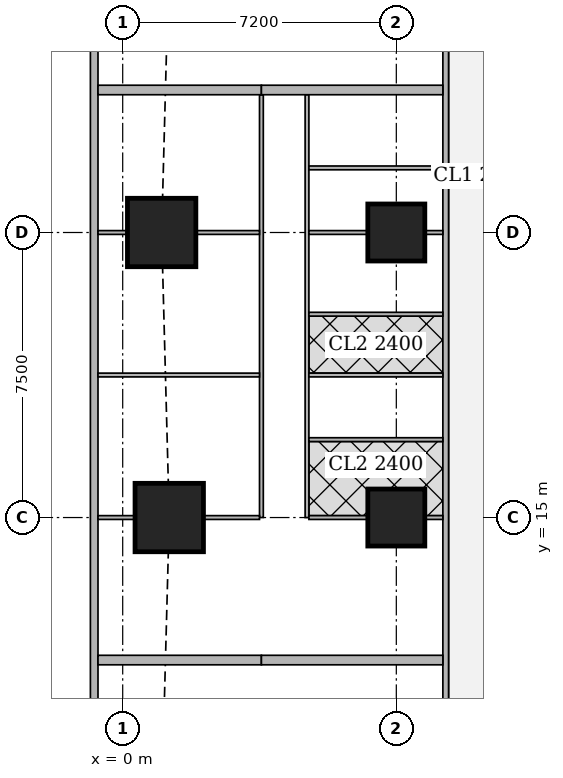
"""IFC4 building model, lengths in metres.
Left out: names, types, materials, properties, quantities, classifications, styles, units other than length and angle.
Written with IfcOpenShell. Run it as: python <this file> out.ifc"""

import sys

from ifc_helpers import new_model, si_unit, direction, frame, frame_2d, origin, origin_2d, place, context, subcontext, project, spatial, rectangle, extrude, element, fill, save


model = new_model("IFC4")
c1 = context("Model", 3, precision=1e-05, world=origin(), true_north=direction((0.0, 1.0)))
c2 = subcontext(c1, "Body", "Model", "MODEL_VIEW")
j1 = project(units=[si_unit("LENGTHUNIT", "METRE"), si_unit("PLANEANGLEUNIT", "RADIAN")], contexts=[c1])
p1 = place(None, origin())
s1 = spatial("IfcSite", under=j1, at=p1, CompositionType="ELEMENT")
p2 = place(p1, origin())
s2 = spatial("IfcBuilding", under=s1, at=p2, CompositionType="ELEMENT")
p3 = place(p2, frame((0.0, 0.0, 139.55)))
s3 = spatial("IfcBuildingStorey", under=s2, at=p3, CompositionType="ELEMENT", Elevation=139.55)
p4 = place(p3, frame((1.225, 15.0, 0.0), z_axis=(0.0, 0.0, 1.0), x_axis=(1.0, 0.0, 0.0)))
e1 = element("IfcColumn", 1, at=p4, inside=s3, PredefinedType="COLUMN", context=c2, shape_type="SweptSolid", body=[
    extrude(rectangle(XDim=1.8, YDim=1.8, at=origin_2d()), origin(), (0.0, 0.0, 1.0), 3.75),
])
p5 = place(p3, frame((7.2, 15.0, 0.0), z_axis=(0.0, 0.0, 1.0), x_axis=(1.0, 0.0, 0.0)))
e2 = element("IfcColumn", 2, at=p5, inside=s3, PredefinedType="COLUMN", context=c2, shape_type="SweptSolid", body=[
    extrude(rectangle(XDim=1.5, YDim=1.5, at=origin_2d()), origin(), (0.0, 0.0, 1.0), 3.75),
])
p6 = place(p3, frame((1.025, 22.5, 0.0), z_axis=(0.0, 0.0, 1.0), x_axis=(1.0, 0.0, 0.0)))
e3 = element("IfcColumn", 3, at=p6, inside=s3, PredefinedType="COLUMN", context=c2, shape_type="SweptSolid", body=[
    extrude(rectangle(XDim=1.8, YDim=1.8, at=origin_2d()), origin(), (0.0, 0.0, 1.0), 3.75),
])
p7 = place(p3, frame((7.2, 22.5, 0.0), z_axis=(0.0, 0.0, 1.0), x_axis=(1.0, 0.0, 0.0)))
e4 = element("IfcColumn", 4, at=p7, inside=s3, PredefinedType="COLUMN", context=c2, shape_type="SweptSolid", body=[
    extrude(rectangle(XDim=1.5, YDim=1.5, at=origin_2d()), origin(), (0.0, 0.0, 1.0), 3.75),
])
p8 = place(p3, frame((-0.75, 42.837, 0.0), z_axis=(0.0, 0.0, 1.0), x_axis=(0.0, -1.0, 0.0)))
e5 = element("IfcWall", 5, at=p8, inside=s3, PredefinedType="SOLIDWALL", context=c2, shape_type="SweptSolid", body=[
    extrude(rectangle(XDim=40.674, YDim=0.2, at=frame_2d((20.337, 0.0))), origin(), (0.0, 0.0, 1.0), 3.5),
])
p9 = place(p8, frame((1.78, 0.0, 0.9)))
e6 = element("IfcOpeningElement", 6, at=p9, cuts=e5, PredefinedType="OPENING", context=c2, shape_type="SweptSolid", body=[
    extrude(rectangle(XDim=1.8, YDim=1.5, at=frame_2d((0.9, 0.75))), frame((0.0, 0.11, 0.0), z_axis=(0.0, -1.0, 0.0), x_axis=(1.0, 0.0, 0.0)), (0.0, 0.0, 1.0), 0.22),
])
p10 = place(p8, frame((6.312, 0.0, 0.9)))
e7 = element("IfcOpeningElement", 7, at=p10, cuts=e5, PredefinedType="OPENING", context=c2, shape_type="SweptSolid", body=[
    extrude(rectangle(XDim=1.8, YDim=1.5, at=frame_2d((0.9, 0.75))), frame((0.0, 0.11, 0.0), z_axis=(0.0, -1.0, 0.0), x_axis=(1.0, 0.0, 0.0)), (0.0, 0.0, 1.0), 0.22),
])
p11 = place(p8, frame((10.062, 0.0, 0.9)))
e8 = element("IfcOpeningElement", 8, at=p11, cuts=e5, PredefinedType="OPENING", context=c2, shape_type="SweptSolid", body=[
    extrude(rectangle(XDim=1.8, YDim=1.5, at=frame_2d((0.9, 0.75))), frame((0.0, 0.11, 0.0), z_axis=(0.0, -1.0, 0.0), x_axis=(1.0, 0.0, 0.0)), (0.0, 0.0, 1.0), 0.22),
])
p12 = place(p8, frame((13.812, 0.0, 0.9)))
e9 = element("IfcOpeningElement", 9, at=p12, cuts=e5, PredefinedType="OPENING", context=c2, shape_type="SweptSolid", body=[
    extrude(rectangle(XDim=1.8, YDim=1.5, at=frame_2d((0.9, 0.75))), frame((0.0, 0.11, 0.0), z_axis=(0.0, -1.0, 0.0), x_axis=(1.0, 0.0, 0.0)), (0.0, 0.0, 1.0), 0.22),
])
p13 = place(p8, frame((17.562, 0.0, 0.9)))
e10 = element("IfcOpeningElement", 10, at=p13, cuts=e5, PredefinedType="OPENING", context=c2, shape_type="SweptSolid", body=[
    extrude(rectangle(XDim=1.8, YDim=1.5, at=frame_2d((0.9, 0.75))), frame((0.0, 0.11, 0.0), z_axis=(0.0, -1.0, 0.0), x_axis=(1.0, 0.0, 0.0)), (0.0, 0.0, 1.0), 0.22),
])
p14 = place(p8, frame((21.312, 0.0, 0.9)))
e11 = element("IfcOpeningElement", 11, at=p14, cuts=e5, PredefinedType="OPENING", context=c2, shape_type="SweptSolid", body=[
    extrude(rectangle(XDim=1.8, YDim=1.5, at=frame_2d((0.9, 0.75))), frame((0.0, 0.11, 0.0), z_axis=(0.0, -1.0, 0.0), x_axis=(1.0, 0.0, 0.0)), (0.0, 0.0, 1.0), 0.22),
])
p15 = place(p8, frame((25.062, 0.0, 0.9)))
e12 = element("IfcOpeningElement", 12, at=p15, cuts=e5, PredefinedType="OPENING", context=c2, shape_type="SweptSolid", body=[
    extrude(rectangle(XDim=1.8, YDim=1.5, at=frame_2d((0.9, 0.75))), frame((0.0, 0.11, 0.0), z_axis=(0.0, -1.0, 0.0), x_axis=(1.0, 0.0, 0.0)), (0.0, 0.0, 1.0), 0.22),
])
p16 = place(p8, frame((28.812, 0.0, 0.9)))
e13 = element("IfcOpeningElement", 13, at=p16, cuts=e5, PredefinedType="OPENING", context=c2, shape_type="SweptSolid", body=[
    extrude(rectangle(XDim=1.8, YDim=1.5, at=frame_2d((0.9, 0.75))), frame((0.0, 0.11, 0.0), z_axis=(0.0, -1.0, 0.0), x_axis=(1.0, 0.0, 0.0)), (0.0, 0.0, 1.0), 0.22),
])
p17 = place(p8, frame((32.562, 0.0, 0.9)))
e14 = element("IfcOpeningElement", 14, at=p17, cuts=e5, PredefinedType="OPENING", context=c2, shape_type="SweptSolid", body=[
    extrude(rectangle(XDim=1.8, YDim=1.5, at=frame_2d((0.9, 0.75))), frame((0.0, 0.11, 0.0), z_axis=(0.0, -1.0, 0.0), x_axis=(1.0, 0.0, 0.0)), (0.0, 0.0, 1.0), 0.22),
])
p18 = place(p8, frame((37.094, 0.0, 0.9)))
e15 = element("IfcOpeningElement", 15, at=p18, cuts=e5, PredefinedType="OPENING", context=c2, shape_type="SweptSolid", body=[
    extrude(rectangle(XDim=1.8, YDim=1.5, at=frame_2d((0.9, 0.75))), frame((0.0, 0.11, 0.0), z_axis=(0.0, -1.0, 0.0), x_axis=(1.0, 0.0, 0.0)), (0.0, 0.0, 1.0), 0.22),
])
p19 = place(p3, frame((8.5, 1.964, 0.0), z_axis=(0.0, 0.0, 1.0), x_axis=(0.0, 1.0, 0.0)))
e16 = element("IfcWall", 16, at=p19, inside=s3, PredefinedType="SOLIDWALL", context=c2, shape_type="SweptSolid", body=[
    extrude(rectangle(XDim=41.097, YDim=0.15, at=frame_2d((20.548, 0.0))), origin(), (0.0, 0.0, 1.0), 3.5),
])
p20 = place(p19, frame((6.911, 0.0, 0.0)))
e17 = element("IfcOpeningElement", 17, at=p20, cuts=e16, PredefinedType="OPENING", context=c2, shape_type="SweptSolid", body=[
    extrude(rectangle(XDim=1.0, YDim=2.1, at=frame_2d((0.5, 1.05))), frame((0.0, 0.085, 0.0), z_axis=(0.0, -1.0, 0.0), x_axis=(1.0, 0.0, 0.0)), (0.0, 0.0, 1.0), 0.17),
])
p21 = place(p19, frame((10.661, 0.0, 0.0)))
e18 = element("IfcOpeningElement", 18, at=p21, cuts=e16, PredefinedType="OPENING", context=c2, shape_type="SweptSolid", body=[
    extrude(rectangle(XDim=1.0, YDim=2.1, at=frame_2d((0.5, 1.05))), frame((0.0, 0.085, 0.0), z_axis=(0.0, -1.0, 0.0), x_axis=(1.0, 0.0, 0.0)), (0.0, 0.0, 1.0), 0.17),
])
p22 = place(p19, frame((25.661, 0.0, 0.0)))
e19 = element("IfcOpeningElement", 19, at=p22, cuts=e16, PredefinedType="OPENING", context=c2, shape_type="SweptSolid", body=[
    extrude(rectangle(XDim=1.0, YDim=2.1, at=frame_2d((0.5, 1.05))), frame((0.0, 0.085, 0.0), z_axis=(0.0, -1.0, 0.0), x_axis=(1.0, 0.0, 0.0)), (0.0, 0.0, 1.0), 0.17),
])
p23 = place(p19, frame((33.161, 0.0, 0.0)))
e20 = element("IfcOpeningElement", 20, at=p23, cuts=e16, PredefinedType="OPENING", context=c2, shape_type="SweptSolid", body=[
    extrude(rectangle(XDim=1.0, YDim=2.1, at=frame_2d((0.5, 1.05))), frame((0.0, 0.085, 0.0), z_axis=(0.0, -1.0, 0.0), x_axis=(1.0, 0.0, 0.0)), (0.0, 0.0, 1.0), 0.17),
])
p24 = place(p3, frame((3.65, 15.0, 0.0), z_axis=(0.0, 0.0, 1.0), x_axis=(0.0, 1.0, 0.0)))
e21 = element("IfcWall", 21, at=p24, inside=s3, PredefinedType="PARTITIONING", context=c2, shape_type="SweptSolid", body=[
    extrude(rectangle(XDim=11.125, YDim=0.1, at=frame_2d((5.562, 0.0))), origin(), (0.0, 0.0, 1.0), 3.5),
])
p25 = place(p24, frame((0.2, 0.0, 0.0)))
e22 = element("IfcOpeningElement", 22, at=p25, cuts=e21, PredefinedType="OPENING", context=c2, shape_type="SweptSolid", body=[
    extrude(rectangle(XDim=0.9, YDim=2.1, at=frame_2d((0.45, 1.05))), frame((0.0, 0.06, 0.0), z_axis=(0.0, -1.0, 0.0), x_axis=(1.0, 0.0, 0.0)), (0.0, 0.0, 1.0), 0.12),
])
p26 = place(p24, frame((3.95, 0.0, 0.0)))
e23 = element("IfcOpeningElement", 23, at=p26, cuts=e21, PredefinedType="OPENING", context=c2, shape_type="SweptSolid", body=[
    extrude(rectangle(XDim=0.9, YDim=2.1, at=frame_2d((0.45, 1.05))), frame((0.0, 0.06, 0.0), z_axis=(0.0, -1.0, 0.0), x_axis=(1.0, 0.0, 0.0)), (0.0, 0.0, 1.0), 0.12),
])
p27 = place(p24, frame((7.7, 0.0, 0.0)))
e24 = element("IfcOpeningElement", 24, at=p27, cuts=e21, PredefinedType="OPENING", context=c2, shape_type="SweptSolid", body=[
    extrude(rectangle(XDim=0.9, YDim=2.1, at=frame_2d((0.45, 1.05))), frame((0.0, 0.06, 0.0), z_axis=(0.0, -1.0, 0.0), x_axis=(1.0, 0.0, 0.0)), (0.0, 0.0, 1.0), 0.12),
])
p28 = place(p3, frame((4.85, 15.0, 0.0), z_axis=(0.0, 0.0, 1.0), x_axis=(0.0, 1.0, 0.0)))
e25 = element("IfcWall", 25, at=p28, inside=s3, PredefinedType="PARTITIONING", context=c2, shape_type="SweptSolid", body=[
    extrude(rectangle(XDim=11.125, YDim=0.1, at=frame_2d((5.562, 0.0))), origin(), (0.0, 0.0, 1.0), 3.5),
])
p29 = place(p28, frame((0.575, 0.0, 0.0)))
e26 = element("IfcOpeningElement", 26, at=p29, cuts=e25, PredefinedType="OPENING", context=c2, shape_type="SweptSolid", body=[
    extrude(rectangle(XDim=0.9, YDim=2.1, at=frame_2d((0.45, 1.05))), frame((0.0, 0.06, 0.0), z_axis=(0.0, -1.0, 0.0), x_axis=(1.0, 0.0, 0.0)), (0.0, 0.0, 1.0), 0.12),
])
p30 = place(p28, frame((4.1, 0.0, 0.0)))
e27 = element("IfcOpeningElement", 27, at=p30, cuts=e25, PredefinedType="OPENING", context=c2, shape_type="SweptSolid", body=[
    extrude(rectangle(XDim=0.9, YDim=2.1, at=frame_2d((0.45, 1.05))), frame((0.0, 0.06, 0.0), z_axis=(0.0, -1.0, 0.0), x_axis=(1.0, 0.0, 0.0)), (0.0, 0.0, 1.0), 0.12),
])
p31 = place(p28, frame((7.9, 0.0, 0.0)))
e28 = element("IfcOpeningElement", 28, at=p31, cuts=e25, PredefinedType="OPENING", context=c2, shape_type="SweptSolid", body=[
    extrude(rectangle(XDim=0.9, YDim=2.1, at=frame_2d((0.45, 1.05))), frame((0.0, 0.06, 0.0), z_axis=(0.0, -1.0, 0.0), x_axis=(1.0, 0.0, 0.0)), (0.0, 0.0, 1.0), 0.12),
])
p32 = place(p28, frame((2.45, 0.0, 0.0)))
e29 = element("IfcOpeningElement", 29, at=p32, cuts=e25, PredefinedType="OPENING", context=c2, shape_type="SweptSolid", body=[
    extrude(rectangle(XDim=0.9, YDim=2.1, at=frame_2d((0.45, 1.05))), frame((0.0, 0.06, 0.0), z_axis=(0.0, -1.0, 0.0), x_axis=(1.0, 0.0, 0.0)), (0.0, 0.0, 1.0), 0.12),
])
p33 = place(p28, frame((5.975, 0.0, 0.0)))
e30 = element("IfcOpeningElement", 30, at=p33, cuts=e25, PredefinedType="OPENING", context=c2, shape_type="SweptSolid", body=[
    extrude(rectangle(XDim=0.9, YDim=2.1, at=frame_2d((0.45, 1.05))), frame((0.0, 0.06, 0.0), z_axis=(0.0, -1.0, 0.0), x_axis=(1.0, 0.0, 0.0)), (0.0, 0.0, 1.0), 0.12),
])
p34 = place(p28, frame((9.775, 0.0, 0.0)))
e31 = element("IfcOpeningElement", 31, at=p34, cuts=e25, PredefinedType="OPENING", context=c2, shape_type="SweptSolid", body=[
    extrude(rectangle(XDim=0.9, YDim=2.1, at=frame_2d((0.45, 1.05))), frame((0.0, 0.06, 0.0), z_axis=(0.0, -1.0, 0.0), x_axis=(1.0, 0.0, 0.0)), (0.0, 0.0, 1.0), 0.12),
])
p35 = place(p3, frame((-0.65, 15.0, 0.0), z_axis=(0.0, 0.0, 1.0), x_axis=(1.0, 0.0, 0.0)))
e32 = element("IfcWall", 32, at=p35, inside=s3, PredefinedType="PARTITIONING", context=c2, shape_type="SweptSolid", body=[
    extrude(rectangle(XDim=0.974, YDim=0.1, at=frame_2d((0.487, 0.0))), origin(), (0.0, 0.0, 1.0), 3.5),
])
p36 = place(p3, frame((2.126, 15.0, 0.0), z_axis=(0.0, 0.0, 1.0), x_axis=(1.0, 0.0, 0.0)))
e33 = element("IfcWall", 33, at=p36, inside=s3, PredefinedType="PARTITIONING", context=c2, shape_type="SweptSolid", body=[
    extrude(rectangle(XDim=1.474, YDim=0.1, at=frame_2d((0.737, 0.0))), origin(), (0.0, 0.0, 1.0), 3.5),
])
p37 = place(p3, frame((-0.65, 18.75, 0.0), z_axis=(0.0, 0.0, 1.0), x_axis=(1.0, 0.0, 0.0)))
e34 = element("IfcWall", 34, at=p37, inside=s3, PredefinedType="PARTITIONING", context=c2, shape_type="SweptSolid", body=[
    extrude(rectangle(XDim=4.25, YDim=0.1, at=frame_2d((2.125, 0.0))), origin(), (0.0, 0.0, 1.0), 2.1),
])
p38 = place(p3, frame((-0.65, 22.5, 0.0), z_axis=(0.0, 0.0, 1.0), x_axis=(1.0, 0.0, 0.0)))
e35 = element("IfcWall", 35, at=p38, inside=s3, PredefinedType="PARTITIONING", context=c2, shape_type="SweptSolid", body=[
    extrude(rectangle(XDim=0.774, YDim=0.1, at=frame_2d((0.387, 0.0))), origin(), (0.0, 0.0, 1.0), 3.5),
])
p39 = place(p3, frame((1.926, 22.5, 0.0), z_axis=(0.0, 0.0, 1.0), x_axis=(1.0, 0.0, 0.0)))
e36 = element("IfcWall", 36, at=p39, inside=s3, PredefinedType="PARTITIONING", context=c2, shape_type="SweptSolid", body=[
    extrude(rectangle(XDim=1.674, YDim=0.1, at=frame_2d((0.837, 0.0))), origin(), (0.0, 0.0, 1.0), 3.5),
])
p40 = place(p3, frame((4.9, 15.0, 0.0), z_axis=(0.0, 0.0, 1.0), x_axis=(1.0, 0.0, 0.0)))
e37 = element("IfcWall", 37, at=p40, inside=s3, PredefinedType="PARTITIONING", context=c2, shape_type="SweptSolid", body=[
    extrude(rectangle(XDim=1.549, YDim=0.1, at=frame_2d((0.774, 0.0))), origin(), (0.0, 0.0, 1.0), 3.5),
])
p41 = place(p3, frame((7.951, 15.0, 0.0), z_axis=(0.0, 0.0, 1.0), x_axis=(1.0, 0.0, 0.0)))
e38 = element("IfcWall", 38, at=p41, inside=s3, PredefinedType="PARTITIONING", context=c2, shape_type="SweptSolid", body=[
    extrude(rectangle(XDim=0.474, YDim=0.1, at=frame_2d((0.237, 0.0))), origin(), (0.0, 0.0, 1.0), 3.5),
])
p42 = place(p3, frame((4.9, 18.75, 0.0), z_axis=(0.0, 0.0, 1.0), x_axis=(1.0, 0.0, 0.0)))
e39 = element("IfcWall", 39, at=p42, inside=s3, PredefinedType="PARTITIONING", context=c2, shape_type="SweptSolid", body=[
    extrude(rectangle(XDim=3.525, YDim=0.1, at=frame_2d((1.763, 0.0))), origin(), (0.0, 0.0, 1.0), 3.5),
])
p43 = place(p3, frame((4.9, 22.5, 0.0), z_axis=(0.0, 0.0, 1.0), x_axis=(1.0, 0.0, 0.0)))
e40 = element("IfcWall", 40, at=p43, inside=s3, PredefinedType="PARTITIONING", context=c2, shape_type="SweptSolid", body=[
    extrude(rectangle(XDim=1.549, YDim=0.1, at=frame_2d((0.774, 0.0))), origin(), (0.0, 0.0, 1.0), 3.5),
])
p44 = place(p3, frame((7.951, 22.5, 0.0), z_axis=(0.0, 0.0, 1.0), x_axis=(1.0, 0.0, 0.0)))
e41 = element("IfcWall", 41, at=p44, inside=s3, PredefinedType="PARTITIONING", context=c2, shape_type="SweptSolid", body=[
    extrude(rectangle(XDim=0.474, YDim=0.1, at=frame_2d((0.237, 0.0))), origin(), (0.0, 0.0, 1.0), 3.5),
])
for number, where, z_axis, x_axis in (
    (42, (4.9, 17.05, 0.0), (0.0, 0.0, 1.0), (1.0, 0.0, 0.0)),
    (43, (4.9, 20.35, 0.0), (0.0, 0.0, 1.0), (1.0, 0.0, 0.0)),
    (44, (4.9, 24.2, 0.0), (0.0, 0.0, 1.0), (1.0, 0.0, 0.0)),
):
    element("IfcWall", number, at=place(p3, frame(where, z_axis=z_axis, x_axis=x_axis)), inside=s3, PredefinedType="PARTITIONING", context=c2, shape_type="SweptSolid", body=[
        extrude(rectangle(XDim=3.525, YDim=0.1, at=frame_2d((1.763, 0.0))), origin(), (0.0, 0.0, 1.0), 3.5),
    ])
p45 = place(p3, frame((-0.65, 11.25, 0.0), z_axis=(0.0, 0.0, 1.0), x_axis=(1.0, 0.0, 0.0)))
e45 = element("IfcWall", 45, at=p45, inside=s3, PredefinedType="SOLIDWALL", context=c2, shape_type="SweptSolid", body=[
    extrude(rectangle(XDim=4.3, YDim=0.25, at=frame_2d((2.15, 0.0))), origin(), (0.0, 0.0, 1.0), 2.1),
])
p46 = place(p3, frame((3.65, 11.25, 0.0), z_axis=(0.0, 0.0, 1.0), x_axis=(1.0, 0.0, 0.0)))
e46 = element("IfcWall", 46, at=p46, inside=s3, PredefinedType="SOLIDWALL", context=c2, shape_type="SweptSolid", body=[
    extrude(rectangle(XDim=4.775, YDim=0.25, at=frame_2d((2.388, 0.0))), origin(), (0.0, 0.0, 1.0), 3.5),
])
p47 = place(p3, frame((-0.65, 26.25, 0.0), z_axis=(0.0, 0.0, 1.0), x_axis=(1.0, 0.0, 0.0)))
e47 = element("IfcWall", 47, at=p47, inside=s3, PredefinedType="SOLIDWALL", context=c2, shape_type="SweptSolid", body=[
    extrude(rectangle(XDim=4.3, YDim=0.25, at=frame_2d((2.15, 0.0))), origin(), (0.0, 0.0, 1.0), 2.1),
])
p48 = place(p3, frame((3.65, 26.25, 0.0), z_axis=(0.0, 0.0, 1.0), x_axis=(1.0, 0.0, 0.0)))
e48 = element("IfcWall", 48, at=p48, inside=s3, PredefinedType="SOLIDWALL", context=c2, shape_type="SweptSolid", body=[
    extrude(rectangle(XDim=4.775, YDim=0.25, at=frame_2d((2.388, 0.0))), origin(), (0.0, 0.0, 1.0), 3.5),
])
p49 = place(p12, origin())
e49 = element("IfcWindow", 49, at=p49, inside=s3, PartitioningType="SINGLE_PANEL", PredefinedType="WINDOW", context=c2, shape_type="SweptSolid", body=[
    extrude(rectangle(XDim=1.8, YDim=1.5, at=frame_2d((0.9, 0.75))), frame((0.0, 0.03, 0.0), z_axis=(0.0, -1.0, 0.0), x_axis=(1.0, 0.0, 0.0)), (0.0, 0.0, 1.0), 0.06),
])
fill(e9, e49)
p50 = place(p13, origin())
e50 = element("IfcWindow", 50, at=p50, inside=s3, PartitioningType="SINGLE_PANEL", PredefinedType="WINDOW", context=c2, shape_type="SweptSolid", body=[
    extrude(rectangle(XDim=1.8, YDim=1.5, at=frame_2d((0.9, 0.75))), frame((0.0, 0.03, 0.0), z_axis=(0.0, -1.0, 0.0), x_axis=(1.0, 0.0, 0.0)), (0.0, 0.0, 1.0), 0.06),
])
fill(e10, e50)
p51 = place(p14, origin())
e51 = element("IfcWindow", 51, at=p51, inside=s3, PartitioningType="SINGLE_PANEL", PredefinedType="WINDOW", context=c2, shape_type="SweptSolid", body=[
    extrude(rectangle(XDim=1.8, YDim=1.5, at=frame_2d((0.9, 0.75))), frame((0.0, 0.03, 0.0), z_axis=(0.0, -1.0, 0.0), x_axis=(1.0, 0.0, 0.0)), (0.0, 0.0, 1.0), 0.06),
])
fill(e11, e51)
p52 = place(p15, origin())
e52 = element("IfcWindow", 52, at=p52, inside=s3, PartitioningType="SINGLE_PANEL", PredefinedType="WINDOW", context=c2, shape_type="SweptSolid", body=[
    extrude(rectangle(XDim=1.8, YDim=1.5, at=frame_2d((0.9, 0.75))), frame((0.0, 0.03, 0.0), z_axis=(0.0, -1.0, 0.0), x_axis=(1.0, 0.0, 0.0)), (0.0, 0.0, 1.0), 0.06),
])
fill(e12, e52)
p53 = place(p16, origin())
e53 = element("IfcWindow", 53, at=p53, inside=s3, PartitioningType="SINGLE_PANEL", PredefinedType="WINDOW", context=c2, shape_type="SweptSolid", body=[
    extrude(rectangle(XDim=1.8, YDim=1.5, at=frame_2d((0.9, 0.75))), frame((0.0, 0.03, 0.0), z_axis=(0.0, -1.0, 0.0), x_axis=(1.0, 0.0, 0.0)), (0.0, 0.0, 1.0), 0.06),
])
fill(e13, e53)
p54 = place(p17, origin())
e54 = element("IfcWindow", 54, at=p54, inside=s3, PartitioningType="SINGLE_PANEL", PredefinedType="WINDOW", context=c2, shape_type="SweptSolid", body=[
    extrude(rectangle(XDim=1.8, YDim=1.5, at=frame_2d((0.9, 0.75))), frame((0.0, 0.03, 0.0), z_axis=(0.0, -1.0, 0.0), x_axis=(1.0, 0.0, 0.0)), (0.0, 0.0, 1.0), 0.06),
])
fill(e14, e54)
p55 = place(p25, origin())
e55 = element("IfcDoor", 55, at=p55, inside=s3, OperationType="SINGLE_SWING_LEFT", PredefinedType="DOOR", context=c2, shape_type="SweptSolid", body=[
    extrude(rectangle(XDim=0.9, YDim=2.1, at=frame_2d((0.45, 1.05))), frame((0.0, 0.025, 0.0), z_axis=(0.0, -1.0, 0.0), x_axis=(1.0, 0.0, 0.0)), (0.0, 0.0, 1.0), 0.05),
])
fill(e22, e55)
p56 = place(p26, origin())
e56 = element("IfcDoor", 56, at=p56, inside=s3, OperationType="SINGLE_SWING_LEFT", PredefinedType="DOOR", context=c2, shape_type="SweptSolid", body=[
    extrude(rectangle(XDim=0.9, YDim=2.1, at=frame_2d((0.45, 1.05))), frame((0.0, 0.025, 0.0), z_axis=(0.0, -1.0, 0.0), x_axis=(1.0, 0.0, 0.0)), (0.0, 0.0, 1.0), 0.05),
])
fill(e23, e56)
p57 = place(p27, origin())
e57 = element("IfcDoor", 57, at=p57, inside=s3, OperationType="SINGLE_SWING_LEFT", PredefinedType="DOOR", context=c2, shape_type="SweptSolid", body=[
    extrude(rectangle(XDim=0.9, YDim=2.1, at=frame_2d((0.45, 1.05))), frame((0.0, 0.025, 0.0), z_axis=(0.0, -1.0, 0.0), x_axis=(1.0, 0.0, 0.0)), (0.0, 0.0, 1.0), 0.05),
])
fill(e24, e57)
p58 = place(p29, origin())
e58 = element("IfcDoor", 58, at=p58, inside=s3, OperationType="SINGLE_SWING_RIGHT", PredefinedType="DOOR", context=c2, shape_type="SweptSolid", body=[
    extrude(rectangle(XDim=0.9, YDim=2.1, at=frame_2d((0.45, 1.05))), frame((0.0, 0.025, 0.0), z_axis=(0.0, -1.0, 0.0), x_axis=(1.0, 0.0, 0.0)), (0.0, 0.0, 1.0), 0.05),
])
fill(e26, e58)
p59 = place(p30, origin())
e59 = element("IfcDoor", 59, at=p59, inside=s3, OperationType="SINGLE_SWING_LEFT", PredefinedType="DOOR", context=c2, shape_type="SweptSolid", body=[
    extrude(rectangle(XDim=0.9, YDim=2.1, at=frame_2d((0.45, 1.05))), frame((0.0, 0.025, 0.0), z_axis=(0.0, -1.0, 0.0), x_axis=(1.0, 0.0, 0.0)), (0.0, 0.0, 1.0), 0.05),
])
fill(e27, e59)
p60 = place(p31, origin())
e60 = element("IfcDoor", 60, at=p60, inside=s3, OperationType="SINGLE_SWING_LEFT", PredefinedType="DOOR", context=c2, shape_type="SweptSolid", body=[
    extrude(rectangle(XDim=0.9, YDim=2.1, at=frame_2d((0.45, 1.05))), frame((0.0, 0.025, 0.0), z_axis=(0.0, -1.0, 0.0), x_axis=(1.0, 0.0, 0.0)), (0.0, 0.0, 1.0), 0.05),
])
fill(e28, e60)
p61 = place(p32, origin())
e61 = element("IfcDoor", 61, at=p61, inside=s3, OperationType="SINGLE_SWING_RIGHT", PredefinedType="DOOR", context=c2, shape_type="SweptSolid", body=[
    extrude(rectangle(XDim=0.9, YDim=2.1, at=frame_2d((0.45, 1.05))), frame((0.0, 0.025, 0.0), z_axis=(0.0, -1.0, 0.0), x_axis=(1.0, 0.0, 0.0)), (0.0, 0.0, 1.0), 0.05),
])
fill(e29, e61)
p62 = place(p33, origin())
e62 = element("IfcDoor", 62, at=p62, inside=s3, OperationType="SINGLE_SWING_RIGHT", PredefinedType="DOOR", context=c2, shape_type="SweptSolid", body=[
    extrude(rectangle(XDim=0.9, YDim=2.1, at=frame_2d((0.45, 1.05))), frame((0.0, 0.025, 0.0), z_axis=(0.0, -1.0, 0.0), x_axis=(1.0, 0.0, 0.0)), (0.0, 0.0, 1.0), 0.05),
])
fill(e30, e62)
p63 = place(p34, origin())
e63 = element("IfcDoor", 63, at=p63, inside=s3, OperationType="SINGLE_SWING_LEFT", PredefinedType="DOOR", context=c2, shape_type="SweptSolid", body=[
    extrude(rectangle(XDim=0.9, YDim=2.1, at=frame_2d((0.45, 1.05))), frame((0.0, 0.025, 0.0), z_axis=(0.0, -1.0, 0.0), x_axis=(1.0, 0.0, 0.0)), (0.0, 0.0, 1.0), 0.05),
])
fill(e31, e63)
p64 = place(p21, origin())
e64 = element("IfcDoor", 64, at=p64, inside=s3, OperationType="SINGLE_SWING_RIGHT", PredefinedType="DOOR", context=c2, shape_type="SweptSolid", body=[
    extrude(rectangle(XDim=1.0, YDim=2.1, at=frame_2d((0.5, 1.05))), frame((0.0, 0.025, 0.0), z_axis=(0.0, -1.0, 0.0), x_axis=(1.0, 0.0, 0.0)), (0.0, 0.0, 1.0), 0.05),
])
fill(e18, e64)
save(model, sys.argv[1])
